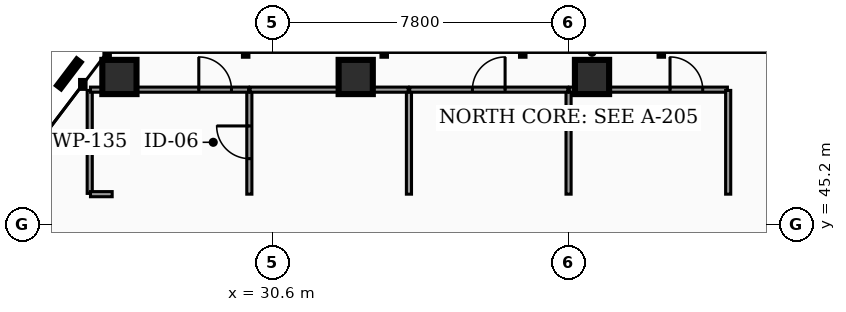
"""IFC4 building model, lengths in metres.
Left out: names, types, materials, properties, quantities, classifications, styles, units other than length and angle.
Written with IfcOpenShell. Run it as: python <this file> out.ifc"""

import sys

from ifc_helpers import new_model, si_unit, direction, frame, frame_2d, origin, origin_2d, place, context, subcontext, project, spatial, rectangle, hollow_rectangle, extrude, element, fill, save


model = new_model("IFC4")
c1 = context("Model", 3, precision=1e-05, world=origin(), true_north=direction((0.0, 1.0)))
c2 = subcontext(c1, "Body", "Model", "MODEL_VIEW")
j1 = project(units=[si_unit("LENGTHUNIT", "METRE"), si_unit("PLANEANGLEUNIT", "RADIAN")], contexts=[c1])
p1 = place(None, origin())
s1 = spatial("IfcSite", under=j1, at=p1, CompositionType="ELEMENT")
p2 = place(p1, origin())
s2 = spatial("IfcBuilding", under=s1, at=p2, CompositionType="ELEMENT")
p3 = place(p2, frame((0.0, 0.0, 72.42)))
s3 = spatial("IfcBuildingStorey", under=s2, at=p3, CompositionType="ELEMENT", Elevation=72.42)
for number, where, z_axis, x_axis in (
    (1, (39.017, 49.083, 0.0), (0.0, 0.0, 1.0), (1.0, 0.0, 0.0)),
    (2, (32.799, 49.083, 0.0), (0.0, 0.0, 1.0), (1.0, 0.0, 0.0)),
    (3, (26.581, 49.083, 0.0), (0.0, 0.0, 1.0), (1.0, 0.0, 0.0)),
):
    element("IfcColumn", number, at=place(p3, frame(where, z_axis=z_axis, x_axis=x_axis)), inside=s3, PredefinedType="COLUMN", context=c2, shape_type="SweptSolid", body=[
        extrude(hollow_rectangle(XDim=0.9, YDim=0.9, WallThickness=0.045, at=origin_2d()), origin(), (0.0, 0.0, 1.0), 3.82),
    ])
p4 = place(p3, frame((30.0, 46.0, 0.0), z_axis=(0.0, 0.0, 1.0), x_axis=(0.0, 1.0, 0.0)))
e4 = element("IfcWall", 4, at=p4, inside=s3, PredefinedType="PARTITIONING", context=c2, shape_type="SweptSolid", body=[
    extrude(rectangle(XDim=2.73, YDim=0.135, at=frame_2d((1.365, 0.0))), origin(), (0.0, 0.0, 1.0), 2.777),
])
p5 = place(p4, frame((0.935, 0.0, 0.0)))
e5 = element("IfcOpeningElement", 5, at=p5, cuts=e4, PredefinedType="OPENING", context=c2, shape_type="SweptSolid", body=[
    extrude(rectangle(XDim=0.86, YDim=2.05, at=frame_2d((0.43, 1.025))), frame((0.0, 0.077, 0.0), z_axis=(0.0, -1.0, 0.0), x_axis=(1.0, 0.0, 0.0)), (0.0, 0.0, 1.0), 0.155),
])
p6 = place(p3, frame((25.8, 46.02, 0.0), z_axis=(0.0, 0.0, 1.0), x_axis=(0.0, 1.0, 0.0)))
e6 = element("IfcWall", 6, at=p6, inside=s3, PredefinedType="PARTITIONING", context=c2, shape_type="SweptSolid", body=[
    extrude(rectangle(XDim=2.71, YDim=0.135, at=frame_2d((1.355, 0.0))), origin(), (0.0, 0.0, 1.0), 2.777),
])
p7 = place(p3, frame((25.82, 48.75, 0.0), z_axis=(0.0, 0.0, 1.0), x_axis=(1.0, 0.0, 0.0)))
e7 = element("IfcWall", 7, at=p7, inside=s3, PredefinedType="PARTITIONING", context=c2, shape_type="SweptSolid", body=[
    extrude(rectangle(XDim=4.16, YDim=0.135, at=frame_2d((2.08, 0.0))), origin(), (0.0, 0.0, 1.0), 2.777),
])
p8 = place(p7, frame((2.85, 0.0, 0.0)))
e8 = element("IfcOpeningElement", 8, at=p8, cuts=e7, PredefinedType="OPENING", context=c2, shape_type="SweptSolid", body=[
    extrude(rectangle(XDim=0.86, YDim=2.05, at=frame_2d((0.43, 1.025))), frame((0.0, 0.077, 0.0), z_axis=(0.0, -1.0, 0.0), x_axis=(1.0, 0.0, 0.0)), (0.0, 0.0, 1.0), 0.155),
])
p9 = place(p3, frame((25.82, 46.0, 0.0), z_axis=(0.0, 0.0, 1.0), x_axis=(1.0, 0.0, 0.0)))
e9 = element("IfcWall", 9, at=p9, inside=s3, PredefinedType="PARTITIONING", context=c2, shape_type="SweptSolid", body=[
    extrude(rectangle(XDim=0.571, YDim=0.135, at=frame_2d((0.285, 0.0))), origin(), (0.0, 0.0, 1.0), 2.777),
])
p10 = place(p3, frame((34.2, 46.0, 0.0), z_axis=(0.0, 0.0, 1.0), x_axis=(0.0, 1.0, 0.0)))
e10 = element("IfcWall", 10, at=p10, inside=s3, PredefinedType="PARTITIONING", context=c2, shape_type="SweptSolid", body=[
    extrude(rectangle(XDim=2.73, YDim=0.135, at=frame_2d((1.365, 0.0))), origin(), (0.0, 0.0, 1.0), 2.777),
])
p11 = place(p3, frame((30.02, 48.75, 0.0), z_axis=(0.0, 0.0, 1.0), x_axis=(1.0, 0.0, 0.0)))
e11 = element("IfcWall", 11, at=p11, inside=s3, PredefinedType="PARTITIONING", context=c2, shape_type="SweptSolid", body=[
    extrude(rectangle(XDim=4.16, YDim=0.135, at=frame_2d((2.08, 0.0))), origin(), (0.0, 0.0, 1.0), 2.777),
])
p12 = place(p3, frame((38.4, 46.0, 0.0), z_axis=(0.0, 0.0, 1.0), x_axis=(0.0, 1.0, 0.0)))
e12 = element("IfcWall", 12, at=p12, inside=s3, PredefinedType="PARTITIONING", context=c2, shape_type="SweptSolid", body=[
    extrude(rectangle(XDim=2.73, YDim=0.135, at=frame_2d((1.365, 0.0))), origin(), (0.0, 0.0, 1.0), 2.777),
])
p13 = place(p3, frame((34.22, 48.75, 0.0), z_axis=(0.0, 0.0, 1.0), x_axis=(1.0, 0.0, 0.0)))
e13 = element("IfcWall", 13, at=p13, inside=s3, PredefinedType="PARTITIONING", context=c2, shape_type="SweptSolid", body=[
    extrude(rectangle(XDim=4.16, YDim=0.135, at=frame_2d((2.08, 0.0))), origin(), (0.0, 0.0, 1.0), 2.777),
])
p14 = place(p13, frame((1.65, 0.0, 0.0)))
e14 = element("IfcOpeningElement", 14, at=p14, cuts=e13, PredefinedType="OPENING", context=c2, shape_type="SweptSolid", body=[
    extrude(rectangle(XDim=0.86, YDim=2.05, at=frame_2d((0.43, 1.025))), frame((0.0, 0.077, 0.0), z_axis=(0.0, -1.0, 0.0), x_axis=(1.0, 0.0, 0.0)), (0.0, 0.0, 1.0), 0.155),
])
p15 = place(p3, frame((38.42, 48.75, 0.0), z_axis=(0.0, 0.0, 1.0), x_axis=(1.0, 0.0, 0.0)))
e15 = element("IfcWall", 15, at=p15, inside=s3, PredefinedType="PARTITIONING", context=c2, shape_type="SweptSolid", body=[
    extrude(rectangle(XDim=4.16, YDim=0.135, at=frame_2d((2.08, 0.0))), origin(), (0.0, 0.0, 1.0), 2.777),
])
p16 = place(p15, frame((2.65, 0.0, 0.0)))
e16 = element("IfcOpeningElement", 16, at=p16, cuts=e15, PredefinedType="OPENING", context=c2, shape_type="SweptSolid", body=[
    extrude(rectangle(XDim=0.86, YDim=2.05, at=frame_2d((0.43, 1.025))), frame((0.0, 0.077, 0.0), z_axis=(0.0, -1.0, 0.0), x_axis=(1.0, 0.0, 0.0)), (0.0, 0.0, 1.0), 0.155),
])
p17 = place(p3, frame((42.6, 46.0, 0.0), z_axis=(0.0, 0.0, 1.0), x_axis=(0.0, 1.0, 0.0)))
e17 = element("IfcWall", 17, at=p17, inside=s3, PredefinedType="PARTITIONING", context=c2, shape_type="SweptSolid", body=[
    extrude(rectangle(XDim=2.73, YDim=0.135, at=frame_2d((1.365, 0.0))), origin(), (0.0, 0.0, 1.0), 2.777),
])
p18 = place(p5, origin())
e18 = element("IfcDoor", 18, at=p18, inside=s3, OperationType="SINGLE_SWING_RIGHT", PredefinedType="DOOR", context=c2, shape_type="SweptSolid", body=[
    extrude(rectangle(XDim=0.86, YDim=2.05, at=frame_2d((0.43, 1.025))), frame((0.0, 0.025, 0.0), z_axis=(0.0, -1.0, 0.0), x_axis=(1.0, 0.0, 0.0)), (0.0, 0.0, 1.0), 0.05),
])
fill(e5, e18)
p19 = place(p8, origin())
e19 = element("IfcDoor", 19, at=p19, inside=s3, OperationType="SINGLE_SWING_LEFT", PredefinedType="DOOR", context=c2, shape_type="SweptSolid", body=[
    extrude(rectangle(XDim=0.86, YDim=2.05, at=frame_2d((0.43, 1.025))), frame((0.0, 0.025, 0.0), z_axis=(0.0, -1.0, 0.0), x_axis=(1.0, 0.0, 0.0)), (0.0, 0.0, 1.0), 0.05),
])
fill(e8, e19)
p20 = place(p14, origin())
e20 = element("IfcDoor", 20, at=p20, inside=s3, OperationType="SINGLE_SWING_RIGHT", PredefinedType="DOOR", context=c2, shape_type="SweptSolid", body=[
    extrude(rectangle(XDim=0.86, YDim=2.05, at=frame_2d((0.43, 1.025))), frame((0.0, 0.025, 0.0), z_axis=(0.0, -1.0, 0.0), x_axis=(1.0, 0.0, 0.0)), (0.0, 0.0, 1.0), 0.05),
])
fill(e14, e20)
p21 = place(p16, origin())
e21 = element("IfcDoor", 21, at=p21, inside=s3, OperationType="SINGLE_SWING_LEFT", PredefinedType="DOOR", context=c2, shape_type="SweptSolid", body=[
    extrude(rectangle(XDim=0.86, YDim=2.05, at=frame_2d((0.43, 1.025))), frame((0.0, 0.025, 0.0), z_axis=(0.0, -1.0, 0.0), x_axis=(1.0, 0.0, 0.0)), (0.0, 0.0, 1.0), 0.05),
])
fill(e16, e21)
save(model, sys.argv[1])
